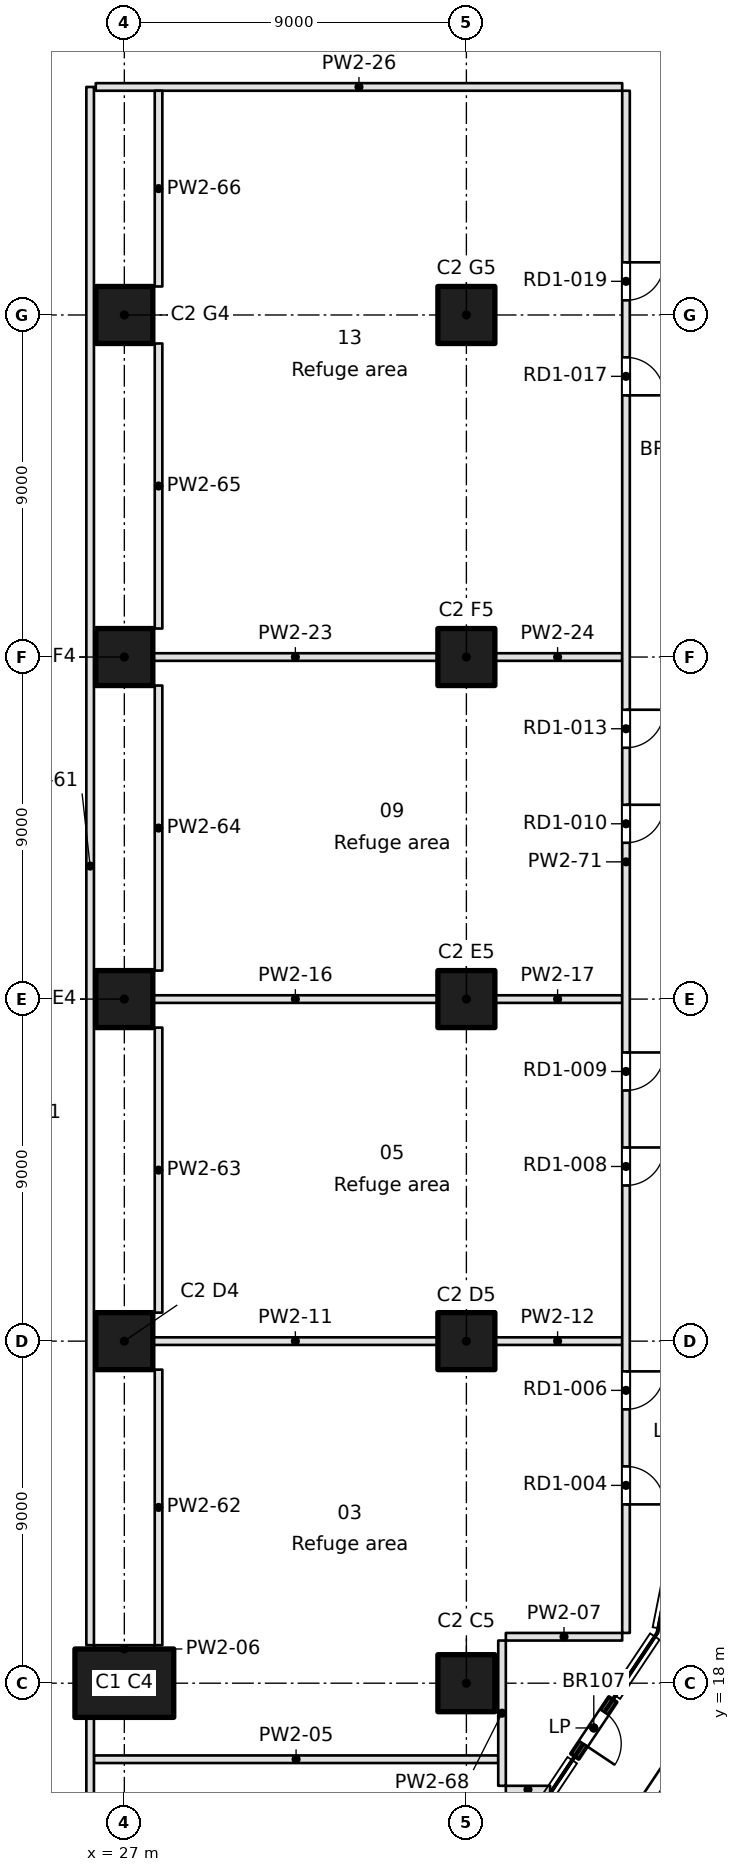
"""IFC4 building model, lengths in metres.
Left out: names, types, materials, properties, quantities, classifications, styles, units other than length and angle.
Written with IfcOpenShell. Run it as: python <this file> out.ifc"""

import sys

from ifc_helpers import new_model, si_unit, direction, frame, frame_2d, origin, origin_2d, place, context, subcontext, project, spatial, rectangle, extrude, element, fill, save


model = new_model("IFC4")
c1 = context("Model", 3, precision=1e-05, world=origin(), true_north=direction((0.0, 1.0)))
c2 = subcontext(c1, "Body", "Model", "MODEL_VIEW")
j1 = project(units=[si_unit("LENGTHUNIT", "METRE"), si_unit("PLANEANGLEUNIT", "RADIAN")], contexts=[c1])
p1 = place(None, origin())
s1 = spatial("IfcSite", under=j1, at=p1, CompositionType="ELEMENT")
p2 = place(p1, origin())
s2 = spatial("IfcBuilding", under=s1, at=p2, CompositionType="ELEMENT")
p3 = place(p2, frame((0.0, 0.0, 31.2)))
s3 = spatial("IfcBuildingStorey", under=s2, at=p3, CompositionType="ELEMENT", Elevation=31.2)
p4 = place(p3, frame((27.0, 18.0, 0.0), z_axis=(0.0, 0.0, 1.0), x_axis=(1.0, 0.0, 0.0)))
e1 = element("IfcColumn", 1, at=p4, inside=s3, PredefinedType="COLUMN", context=c2, shape_type="SweptSolid", body=[
    extrude(rectangle(XDim=2.6, YDim=1.8, at=origin_2d()), origin(), (0.0, 0.0, 1.0), 4.6),
])
for number, where, z_axis, x_axis in (
    (2, (27.0, 27.0, 0.0), (0.0, 0.0, 1.0), (1.0, 0.0, 0.0)),
    (3, (27.0, 36.0, 0.0), (0.0, 0.0, 1.0), (1.0, 0.0, 0.0)),
    (4, (27.0, 45.0, 0.0), (0.0, 0.0, 1.0), (1.0, 0.0, 0.0)),
    (5, (27.0, 54.0, 0.0), (0.0, 0.0, 1.0), (1.0, 0.0, 0.0)),
    (6, (36.0, 18.0, 0.0), (0.0, 0.0, 1.0), (1.0, 0.0, 0.0)),
    (7, (36.0, 27.0, 0.0), (0.0, 0.0, 1.0), (1.0, 0.0, 0.0)),
    (8, (36.0, 36.0, 0.0), (0.0, 0.0, 1.0), (1.0, 0.0, 0.0)),
    (9, (36.0, 45.0, 0.0), (0.0, 0.0, 1.0), (1.0, 0.0, 0.0)),
    (10, (36.0, 54.0, 0.0), (0.0, 0.0, 1.0), (1.0, 0.0, 0.0)),
):
    element("IfcColumn", number, at=place(p3, frame(where, z_axis=z_axis, x_axis=x_axis)), inside=s3, PredefinedType="COLUMN", context=c2, shape_type="SweptSolid", body=[
        extrude(rectangle(XDim=1.5, YDim=1.5, at=origin_2d()), origin(), (0.0, 0.0, 1.0), 4.6),
    ])
p5 = place(p3, frame((38.852, 16.074, 0.0), z_axis=(0.0, 0.0, 1.0), x_axis=(0.555576323502, 0.83146554274, 0.0)))
e11 = element("IfcWall", 11, at=p5, inside=s3, PredefinedType="SOLIDWALL", context=c2, shape_type="SweptSolid", body=[
    extrude(rectangle(XDim=1.8, YDim=0.25, at=frame_2d((0.9, 0.0))), origin(), (0.0, 0.0, 1.0), 4.2),
])
p6 = place(p5, frame((0.4, 0.0, 0.0)))
e12 = element("IfcOpeningElement", 12, at=p6, cuts=e11, PredefinedType="OPENING", context=c2, shape_type="SweptSolid", body=[
    extrude(rectangle(XDim=1.0, YDim=2.1, at=frame_2d((0.5, 1.05))), frame((0.0, 0.125, 0.0), z_axis=(0.0, -1.0, 0.0), x_axis=(1.0, 0.0, 0.0)), (0.0, 0.0, 1.0), 0.25),
])
p7 = place(p3, frame((38.203, 15.2, 0.0), z_axis=(0.0, 0.0, 1.0), x_axis=(-1.0, 0.0, 0.0)))
e13 = element("IfcWall", 13, at=p7, inside=s3, PredefinedType="PARTITIONING", context=c2, shape_type="SweptSolid", body=[
    extrude(rectangle(XDim=1.165, YDim=0.2, at=frame_2d((0.583, 0.0))), origin(), (0.0, 0.0, 1.0), 4.2),
])
p8 = place(p3, frame((26.2, 15.999, 0.0), z_axis=(0.0, 0.0, 1.0), x_axis=(1.0, 0.0, 0.0)))
e14 = element("IfcWall", 14, at=p8, inside=s3, PredefinedType="PARTITIONING", context=c2, shape_type="SweptSolid", body=[
    extrude(rectangle(XDim=10.638, YDim=0.2, at=frame_2d((5.319, 0.0))), origin(), (0.0, 0.0, 1.0), 4.2),
])
p9 = place(p3, frame((26.2, 18.9, 0.0), z_axis=(0.0, 0.0, 1.0), x_axis=(1.0, 0.0, 0.0)))
e15 = element("IfcWall", 15, at=p9, inside=s3, PredefinedType="PARTITIONING", context=c2, shape_type="SweptSolid", body=[
    extrude(rectangle(XDim=1.6, YDim=0.2, at=frame_2d((0.8, 0.0))), origin(), (0.0, 0.0, 1.0), 4.2),
])
p10 = place(p3, frame((37.038, 19.222, 0.0), z_axis=(0.0, 0.0, 1.0), x_axis=(1.0, 0.0, 0.0)))
e16 = element("IfcWall", 16, at=p10, inside=s3, PredefinedType="PARTITIONING", context=c2, shape_type="SweptSolid", body=[
    extrude(rectangle(XDim=3.062, YDim=0.2, at=frame_2d((1.531, 0.0))), origin(), (0.0, 0.0, 1.0), 4.2),
])
p11 = place(p3, frame((27.7, 27.0, 0.0), z_axis=(0.0, 0.0, 1.0), x_axis=(1.0, 0.0, 0.0)))
e17 = element("IfcWall", 17, at=p11, inside=s3, PredefinedType="PARTITIONING", context=c2, shape_type="SweptSolid", body=[
    extrude(rectangle(XDim=7.6, YDim=0.2, at=frame_2d((3.8, 0.0))), origin(), (0.0, 0.0, 1.0), 4.2),
])
p12 = place(p3, frame((36.7, 27.0, 0.0), z_axis=(0.0, 0.0, 1.0), x_axis=(1.0, 0.0, 0.0)))
e18 = element("IfcWall", 18, at=p12, inside=s3, PredefinedType="PARTITIONING", context=c2, shape_type="SweptSolid", body=[
    extrude(rectangle(XDim=3.4, YDim=0.2, at=frame_2d((1.7, 0.0))), origin(), (0.0, 0.0, 1.0), 4.2),
])
p13 = place(p3, frame((27.7, 36.0, 0.0), z_axis=(0.0, 0.0, 1.0), x_axis=(1.0, 0.0, 0.0)))
e19 = element("IfcWall", 19, at=p13, inside=s3, PredefinedType="PARTITIONING", context=c2, shape_type="SweptSolid", body=[
    extrude(rectangle(XDim=7.6, YDim=0.2, at=frame_2d((3.8, 0.0))), origin(), (0.0, 0.0, 1.0), 4.2),
])
p14 = place(p3, frame((36.7, 36.0, 0.0), z_axis=(0.0, 0.0, 1.0), x_axis=(1.0, 0.0, 0.0)))
e20 = element("IfcWall", 20, at=p14, inside=s3, PredefinedType="PARTITIONING", context=c2, shape_type="SweptSolid", body=[
    extrude(rectangle(XDim=3.4, YDim=0.2, at=frame_2d((1.7, 0.0))), origin(), (0.0, 0.0, 1.0), 4.2),
])
p15 = place(p3, frame((27.7, 45.0, 0.0), z_axis=(0.0, 0.0, 1.0), x_axis=(1.0, 0.0, 0.0)))
e21 = element("IfcWall", 21, at=p15, inside=s3, PredefinedType="PARTITIONING", context=c2, shape_type="SweptSolid", body=[
    extrude(rectangle(XDim=7.6, YDim=0.2, at=frame_2d((3.8, 0.0))), origin(), (0.0, 0.0, 1.0), 4.2),
])
p16 = place(p3, frame((36.7, 45.0, 0.0), z_axis=(0.0, 0.0, 1.0), x_axis=(1.0, 0.0, 0.0)))
e22 = element("IfcWall", 22, at=p16, inside=s3, PredefinedType="PARTITIONING", context=c2, shape_type="SweptSolid", body=[
    extrude(rectangle(XDim=3.4, YDim=0.2, at=frame_2d((1.7, 0.0))), origin(), (0.0, 0.0, 1.0), 4.2),
])
p17 = place(p3, frame((40.1, 60.0, 0.0), z_axis=(0.0, 0.0, 1.0), x_axis=(-1.0, 0.0, 0.0)))
e23 = element("IfcWall", 23, at=p17, inside=s3, PredefinedType="PARTITIONING", context=c2, shape_type="SweptSolid", body=[
    extrude(rectangle(XDim=13.853, YDim=0.2, at=frame_2d((6.926, 0.0))), origin(), (0.0, 0.0, 1.0), 4.2),
])
p18 = place(p3, frame((26.1, 17.2, 0.0), z_axis=(0.0, 0.0, 1.0), x_axis=(0.0, -1.0, 0.0)))
e24 = element("IfcWall", 24, at=p18, inside=s3, PredefinedType="PARTITIONING", context=c2, shape_type="SweptSolid", body=[
    extrude(rectangle(XDim=7.713, YDim=0.2, at=frame_2d((3.856, 0.0))), origin(), (0.0, 0.0, 1.0), 4.2),
])
p19 = place(p3, frame((26.1, 60.0, 0.0), z_axis=(0.0, 0.0, 1.0), x_axis=(0.0, -1.0, 0.0)))
e25 = element("IfcWall", 25, at=p19, inside=s3, PredefinedType="PARTITIONING", context=c2, shape_type="SweptSolid", body=[
    extrude(rectangle(XDim=41.0, YDim=0.2, at=frame_2d((20.5, 0.0))), origin(), (0.0, 0.0, 1.0), 4.2),
])
p20 = place(p3, frame((27.9, 26.25, 0.0), z_axis=(0.0, 0.0, 1.0), x_axis=(0.0, -1.0, 0.0)))
e26 = element("IfcWall", 26, at=p20, inside=s3, PredefinedType="PARTITIONING", context=c2, shape_type="SweptSolid", body=[
    extrude(rectangle(XDim=7.25, YDim=0.2, at=frame_2d((3.625, 0.0))), origin(), (0.0, 0.0, 1.0), 4.2),
])
for number, where, z_axis, x_axis in (
    (27, (27.9, 35.25, 0.0), (0.0, 0.0, 1.0), (0.0, -1.0, 0.0)),
    (28, (27.9, 44.25, 0.0), (0.0, 0.0, 1.0), (0.0, -1.0, 0.0)),
    (29, (27.9, 53.25, 0.0), (0.0, 0.0, 1.0), (0.0, -1.0, 0.0)),
):
    element("IfcWall", number, at=place(p3, frame(where, z_axis=z_axis, x_axis=x_axis)), inside=s3, PredefinedType="PARTITIONING", context=c2, shape_type="SweptSolid", body=[
        extrude(rectangle(XDim=7.5, YDim=0.2, at=frame_2d((3.75, 0.0))), origin(), (0.0, 0.0, 1.0), 4.2),
    ])
p21 = place(p3, frame((27.9, 59.9, 0.0), z_axis=(0.0, 0.0, 1.0), x_axis=(0.0, -1.0, 0.0)))
e30 = element("IfcWall", 30, at=p21, inside=s3, PredefinedType="PARTITIONING", context=c2, shape_type="SweptSolid", body=[
    extrude(rectangle(XDim=5.15, YDim=0.2, at=frame_2d((2.575, 0.0))), origin(), (0.0, 0.0, 1.0), 4.2),
])
p22 = place(p3, frame((36.938, 15.3, 0.0), z_axis=(0.0, 0.0, 1.0), x_axis=(0.0, 1.0, 0.0)))
e31 = element("IfcWall", 31, at=p22, inside=s3, PredefinedType="PARTITIONING", context=c2, shape_type="SweptSolid", body=[
    extrude(rectangle(XDim=3.822, YDim=0.2, at=frame_2d((1.911, 0.0))), origin(), (0.0, 0.0, 1.0), 4.2),
])
p23 = place(p3, frame((40.2, 19.322, 0.0), z_axis=(0.0, 0.0, 1.0), x_axis=(0.0, 1.0, 0.0)))
e32 = element("IfcWall", 32, at=p23, inside=s3, PredefinedType="PARTITIONING", context=c2, shape_type="SweptSolid", body=[
    extrude(rectangle(XDim=40.578, YDim=0.2, at=frame_2d((20.289, 0.0))), origin(), (0.0, 0.0, 1.0), 4.2),
])
p24 = place(p23, frame((3.383, 0.0, 0.0)))
e33 = element("IfcOpeningElement", 33, at=p24, cuts=e32, PredefinedType="OPENING", context=c2, shape_type="SweptSolid", body=[
    extrude(rectangle(XDim=1.0, YDim=2.1, at=frame_2d((0.5, 1.05))), frame((0.0, 0.1, 0.0), z_axis=(0.0, -1.0, 0.0), x_axis=(1.0, 0.0, 0.0)), (0.0, 0.0, 1.0), 0.2),
])
p25 = place(p23, frame((5.883, 0.0, 0.0)))
e34 = element("IfcOpeningElement", 34, at=p25, cuts=e32, PredefinedType="OPENING", context=c2, shape_type="SweptSolid", body=[
    extrude(rectangle(XDim=1.0, YDim=2.1, at=frame_2d((0.5, 1.05))), frame((0.0, 0.1, 0.0), z_axis=(0.0, -1.0, 0.0), x_axis=(1.0, 0.0, 0.0)), (0.0, 0.0, 1.0), 0.2),
])
p26 = place(p23, frame((11.774, 0.0, 0.0)))
e35 = element("IfcOpeningElement", 35, at=p26, cuts=e32, PredefinedType="OPENING", context=c2, shape_type="SweptSolid", body=[
    extrude(rectangle(XDim=1.0, YDim=2.1, at=frame_2d((0.5, 1.05))), frame((0.0, 0.1, 0.0), z_axis=(0.0, -1.0, 0.0), x_axis=(1.0, 0.0, 0.0)), (0.0, 0.0, 1.0), 0.2),
])
p27 = place(p23, frame((14.274, 0.0, 0.0)))
e36 = element("IfcOpeningElement", 36, at=p27, cuts=e32, PredefinedType="OPENING", context=c2, shape_type="SweptSolid", body=[
    extrude(rectangle(XDim=1.0, YDim=2.1, at=frame_2d((0.5, 1.05))), frame((0.0, 0.1, 0.0), z_axis=(0.0, -1.0, 0.0), x_axis=(1.0, 0.0, 0.0)), (0.0, 0.0, 1.0), 0.2),
])
p28 = place(p23, frame((20.791, 0.0, 0.0)))
e37 = element("IfcOpeningElement", 37, at=p28, cuts=e32, PredefinedType="OPENING", context=c2, shape_type="SweptSolid", body=[
    extrude(rectangle(XDim=1.0, YDim=2.1, at=frame_2d((0.5, 1.05))), frame((0.0, 0.1, 0.0), z_axis=(0.0, -1.0, 0.0), x_axis=(1.0, 0.0, 0.0)), (0.0, 0.0, 1.0), 0.2),
])
p29 = place(p23, frame((23.291, 0.0, 0.0)))
e38 = element("IfcOpeningElement", 38, at=p29, cuts=e32, PredefinedType="OPENING", context=c2, shape_type="SweptSolid", body=[
    extrude(rectangle(XDim=1.0, YDim=2.1, at=frame_2d((0.5, 1.05))), frame((0.0, 0.1, 0.0), z_axis=(0.0, -1.0, 0.0), x_axis=(1.0, 0.0, 0.0)), (0.0, 0.0, 1.0), 0.2),
])
p30 = place(p23, frame((32.564, 0.0, 0.0)))
e39 = element("IfcOpeningElement", 39, at=p30, cuts=e32, PredefinedType="OPENING", context=c2, shape_type="SweptSolid", body=[
    extrude(rectangle(XDim=1.0, YDim=2.1, at=frame_2d((0.5, 1.05))), frame((0.0, 0.1, 0.0), z_axis=(0.0, -1.0, 0.0), x_axis=(1.0, 0.0, 0.0)), (0.0, 0.0, 1.0), 0.2),
])
p31 = place(p23, frame((35.064, 0.0, 0.0)))
e40 = element("IfcOpeningElement", 40, at=p31, cuts=e32, PredefinedType="OPENING", context=c2, shape_type="SweptSolid", body=[
    extrude(rectangle(XDim=1.0, YDim=2.1, at=frame_2d((0.5, 1.05))), frame((0.0, 0.1, 0.0), z_axis=(0.0, -1.0, 0.0), x_axis=(1.0, 0.0, 0.0)), (0.0, 0.0, 1.0), 0.2),
])
p32 = place(p6, frame((1.0, 0.0, 0.0), z_axis=(0.0, 0.0, 1.0), x_axis=(-1.0, 0.0, 0.0)))
e41 = element("IfcDoor", 41, at=p32, inside=s3, OperationType="SINGLE_SWING_RIGHT", PredefinedType="DOOR", context=c2, shape_type="SweptSolid", body=[
    extrude(rectangle(XDim=1.0, YDim=2.1, at=frame_2d((0.5, 1.05))), frame((0.0, 0.025, 0.0), z_axis=(0.0, -1.0, 0.0), x_axis=(1.0, 0.0, 0.0)), (0.0, 0.0, 1.0), 0.05),
])
fill(e12, e41)
p33 = place(p24, frame((1.0, 0.0, 0.0), z_axis=(0.0, 0.0, 1.0), x_axis=(-1.0, 0.0, 0.0)))
e42 = element("IfcDoor", 42, at=p33, inside=s3, OperationType="SINGLE_SWING_RIGHT", PredefinedType="DOOR", context=c2, shape_type="SweptSolid", body=[
    extrude(rectangle(XDim=1.0, YDim=2.1, at=frame_2d((0.5, 1.05))), frame((0.0, 0.025, 0.0), z_axis=(0.0, -1.0, 0.0), x_axis=(1.0, 0.0, 0.0)), (0.0, 0.0, 1.0), 0.05),
])
fill(e33, e42)
p34 = place(p25, frame((1.0, 0.0, 0.0), z_axis=(0.0, 0.0, 1.0), x_axis=(-1.0, 0.0, 0.0)))
e43 = element("IfcDoor", 43, at=p34, inside=s3, OperationType="SINGLE_SWING_LEFT", PredefinedType="DOOR", context=c2, shape_type="SweptSolid", body=[
    extrude(rectangle(XDim=1.0, YDim=2.1, at=frame_2d((0.5, 1.05))), frame((0.0, 0.025, 0.0), z_axis=(0.0, -1.0, 0.0), x_axis=(1.0, 0.0, 0.0)), (0.0, 0.0, 1.0), 0.05),
])
fill(e34, e43)
p35 = place(p26, frame((1.0, 0.0, 0.0), z_axis=(0.0, 0.0, 1.0), x_axis=(-1.0, 0.0, 0.0)))
e44 = element("IfcDoor", 44, at=p35, inside=s3, OperationType="SINGLE_SWING_LEFT", PredefinedType="DOOR", context=c2, shape_type="SweptSolid", body=[
    extrude(rectangle(XDim=1.0, YDim=2.1, at=frame_2d((0.5, 1.05))), frame((0.0, 0.025, 0.0), z_axis=(0.0, -1.0, 0.0), x_axis=(1.0, 0.0, 0.0)), (0.0, 0.0, 1.0), 0.05),
])
fill(e35, e44)
p36 = place(p27, frame((1.0, 0.0, 0.0), z_axis=(0.0, 0.0, 1.0), x_axis=(-1.0, 0.0, 0.0)))
e45 = element("IfcDoor", 45, at=p36, inside=s3, OperationType="SINGLE_SWING_LEFT", PredefinedType="DOOR", context=c2, shape_type="SweptSolid", body=[
    extrude(rectangle(XDim=1.0, YDim=2.1, at=frame_2d((0.5, 1.05))), frame((0.0, 0.025, 0.0), z_axis=(0.0, -1.0, 0.0), x_axis=(1.0, 0.0, 0.0)), (0.0, 0.0, 1.0), 0.05),
])
fill(e36, e45)
p37 = place(p28, frame((1.0, 0.0, 0.0), z_axis=(0.0, 0.0, 1.0), x_axis=(-1.0, 0.0, 0.0)))
e46 = element("IfcDoor", 46, at=p37, inside=s3, OperationType="SINGLE_SWING_LEFT", PredefinedType="DOOR", context=c2, shape_type="SweptSolid", body=[
    extrude(rectangle(XDim=1.0, YDim=2.1, at=frame_2d((0.5, 1.05))), frame((0.0, 0.025, 0.0), z_axis=(0.0, -1.0, 0.0), x_axis=(1.0, 0.0, 0.0)), (0.0, 0.0, 1.0), 0.05),
])
fill(e37, e46)
p38 = place(p29, frame((1.0, 0.0, 0.0), z_axis=(0.0, 0.0, 1.0), x_axis=(-1.0, 0.0, 0.0)))
e47 = element("IfcDoor", 47, at=p38, inside=s3, OperationType="SINGLE_SWING_LEFT", PredefinedType="DOOR", context=c2, shape_type="SweptSolid", body=[
    extrude(rectangle(XDim=1.0, YDim=2.1, at=frame_2d((0.5, 1.05))), frame((0.0, 0.025, 0.0), z_axis=(0.0, -1.0, 0.0), x_axis=(1.0, 0.0, 0.0)), (0.0, 0.0, 1.0), 0.05),
])
fill(e38, e47)
p39 = place(p30, frame((1.0, 0.0, 0.0), z_axis=(0.0, 0.0, 1.0), x_axis=(-1.0, 0.0, 0.0)))
e48 = element("IfcDoor", 48, at=p39, inside=s3, OperationType="SINGLE_SWING_RIGHT", PredefinedType="DOOR", context=c2, shape_type="SweptSolid", body=[
    extrude(rectangle(XDim=1.0, YDim=2.1, at=frame_2d((0.5, 1.05))), frame((0.0, 0.025, 0.0), z_axis=(0.0, -1.0, 0.0), x_axis=(1.0, 0.0, 0.0)), (0.0, 0.0, 1.0), 0.05),
])
fill(e39, e48)
p40 = place(p31, frame((1.0, 0.0, 0.0), z_axis=(0.0, 0.0, 1.0), x_axis=(-1.0, 0.0, 0.0)))
e49 = element("IfcDoor", 49, at=p40, inside=s3, OperationType="SINGLE_SWING_LEFT", PredefinedType="DOOR", context=c2, shape_type="SweptSolid", body=[
    extrude(rectangle(XDim=1.0, YDim=2.1, at=frame_2d((0.5, 1.05))), frame((0.0, 0.025, 0.0), z_axis=(0.0, -1.0, 0.0), x_axis=(1.0, 0.0, 0.0)), (0.0, 0.0, 1.0), 0.05),
])
fill(e40, e49)
save(model, sys.argv[1])
